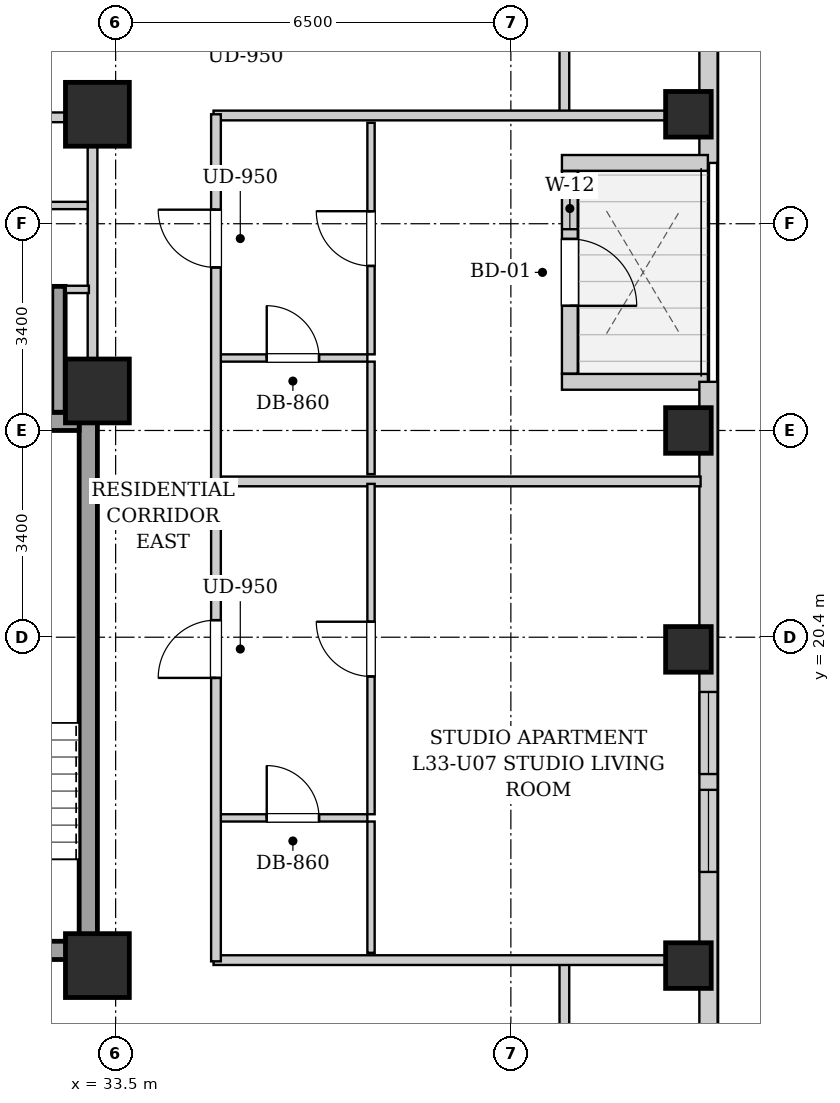
"""IFC4 building model, lengths in metres.
Left out: names, types, materials, properties, quantities, classifications, styles, units other than length and angle.
Written with IfcOpenShell. Run it as: python <this file> out.ifc"""

import sys

from ifc_helpers import new_model, si_unit, direction, frame, frame_2d, origin, origin_2d, place, context, subcontext, project, spatial, rectangle, extrude, element, fill, save


model = new_model("IFC4")
c1 = context("Model", 3, precision=1e-05, world=origin(), true_north=direction((0.0, 1.0)))
c2 = subcontext(c1, "Body", "Model", "MODEL_VIEW")
j1 = project(units=[si_unit("LENGTHUNIT", "METRE"), si_unit("PLANEANGLEUNIT", "RADIAN")], contexts=[c1])
p1 = place(None, origin())
s1 = spatial("IfcSite", under=j1, at=p1, CompositionType="ELEMENT")
p2 = place(p1, origin())
s2 = spatial("IfcBuilding", under=s1, at=p2, CompositionType="ELEMENT")
p3 = place(p2, frame((0.0, 0.0, 116.7)))
s3 = spatial("IfcBuildingStorey", under=s2, at=p3, CompositionType="ELEMENT", Elevation=116.7)
for number, where, z_axis, x_axis in (
    (1, (42.92, 15.0, 0.0), (0.0, 0.0, 1.0), (1.0, 0.0, 0.0)),
    (2, (42.92, 20.2, 0.0), (0.0, 0.0, 1.0), (1.0, 0.0, 0.0)),
    (3, (42.92, 23.8, 0.0), (0.0, 0.0, 1.0), (1.0, 0.0, 0.0)),
    (4, (42.92, 29.0, 0.0), (0.0, 0.0, 1.0), (1.0, 0.0, 0.0)),
):
    element("IfcColumn", number, at=place(p3, frame(where, z_axis=z_axis, x_axis=x_axis)), inside=s3, PredefinedType="COLUMN", context=c2, shape_type="SweptSolid", body=[
        extrude(rectangle(XDim=0.75, YDim=0.75, at=origin_2d()), origin(), (0.0, 0.0, 1.0), 3.2),
    ])
for number, where, z_axis, x_axis in (
    (5, (33.2, 15.0, 0.0), (0.0, 0.0, 1.0), (1.0, 0.0, 0.0)),
    (6, (33.2, 29.0, 0.0), (0.0, 0.0, 1.0), (1.0, 0.0, 0.0)),
    (7, (33.2, 24.45, 0.0), (0.0, 0.0, 1.0), (1.0, 0.0, 0.0)),
):
    element("IfcColumn", number, at=place(p3, frame(where, z_axis=z_axis, x_axis=x_axis)), inside=s3, PredefinedType="COLUMN", context=c2, shape_type="SweptSolid", body=[
        extrude(rectangle(XDim=1.05, YDim=1.05, at=origin_2d()), origin(), (0.0, 0.0, 1.0), 3.2),
    ])
p4 = place(p3, frame((43.25, 40.8, 0.0), z_axis=(0.0, 0.0, 1.0), x_axis=(0.0, -1.0, 0.0)))
e8 = element("IfcWall", 8, at=p4, inside=s3, PredefinedType="SOLIDWALL", context=c2, shape_type="SweptSolid", body=[
    extrude(rectangle(XDim=12.6, YDim=0.3, at=frame_2d((6.3, 0.0))), origin(), (0.0, 0.0, 1.0), 2.88),
])
p5 = place(p3, frame((43.24, 28.2, 0.0), z_axis=(0.0, 0.0, 1.0), x_axis=(-1.0, 0.0, 0.0)))
e9 = element("IfcWall", 9, at=p5, inside=s3, PredefinedType="SOLIDWALL", context=c2, shape_type="SweptSolid", body=[
    extrude(rectangle(XDim=2.4, YDim=0.26, at=frame_2d((1.2, 0.0))), origin(), (0.0, 0.0, 1.0), 2.88),
])
p6 = place(p3, frame((40.97, 28.066, 0.0), z_axis=(0.0, 0.0, 1.0), x_axis=(0.0, -1.0, 0.0)))
e10 = element("IfcWall", 10, at=p6, inside=s3, PredefinedType="SOLIDWALL", context=c2, shape_type="SweptSolid", body=[
    extrude(rectangle(XDim=3.332, YDim=0.26, at=frame_2d((1.666, 0.0))), origin(), (0.0, 0.0, 1.0), 2.88),
])
p7 = place(p6, frame((1.116, 0.0, 0.0)))
e11 = element("IfcOpeningElement", 11, at=p7, cuts=e10, PredefinedType="OPENING", context=c2, shape_type="SweptSolid", body=[
    extrude(rectangle(XDim=1.1, YDim=2.0, at=frame_2d((0.55, 1.0))), frame((0.0, 0.14, 0.0), z_axis=(0.0, -1.0, 0.0), x_axis=(1.0, 0.0, 0.0)), (0.0, 0.0, 1.0), 0.28),
])
p8 = place(p6, frame((0.276, 0.0, 0.55)))
e12 = element("IfcOpeningElement", 12, at=p8, cuts=e10, PredefinedType="OPENING", context=c2, shape_type="SweptSolid", body=[
    extrude(rectangle(XDim=0.68, YDim=1.2, at=frame_2d((0.34, 0.6))), frame((0.0, 0.14, 0.0), z_axis=(0.0, -1.0, 0.0), x_axis=(1.0, 0.0, 0.0)), (0.0, 0.0, 1.0), 0.28),
])
p9 = place(p3, frame((40.84, 24.6, 0.0), z_axis=(0.0, 0.0, 1.0), x_axis=(1.0, 0.0, 0.0)))
e13 = element("IfcWall", 13, at=p9, inside=s3, PredefinedType="SOLIDWALL", context=c2, shape_type="SweptSolid", body=[
    extrude(rectangle(XDim=2.4, YDim=0.26, at=frame_2d((1.2, 0.0))), origin(), (0.0, 0.0, 1.0), 2.88),
])
p10 = place(p3, frame((43.25, 24.6, 0.0), z_axis=(0.0, 0.0, 1.0), x_axis=(0.0, -1.0, 0.0)))
e14 = element("IfcWall", 14, at=p10, inside=s3, PredefinedType="SOLIDWALL", context=c2, shape_type="SweptSolid", body=[
    extrude(rectangle(XDim=22.1, YDim=0.3, at=frame_2d((11.05, 0.0))), origin(), (0.0, 0.0, 1.0), 2.88),
])
p11 = place(p10, frame((17.366, 0.0, 0.55)))
e15 = element("IfcOpeningElement", 15, at=p11, cuts=e14, PredefinedType="OPENING", context=c2, shape_type="SweptSolid", body=[
    extrude(rectangle(XDim=1.35, YDim=1.2, at=frame_2d((0.675, 0.6))), frame((0.0, 0.16, 0.0), z_axis=(0.0, -1.0, 0.0), x_axis=(1.0, 0.0, 0.0)), (0.0, 0.0, 1.0), 0.32),
])
p12 = place(p10, frame((15.535, 0.0, 0.55)))
e16 = element("IfcOpeningElement", 16, at=p12, cuts=e14, PredefinedType="OPENING", context=c2, shape_type="SweptSolid", body=[
    extrude(rectangle(XDim=1.35, YDim=1.2, at=frame_2d((0.675, 0.6))), frame((0.0, 0.16, 0.0), z_axis=(0.0, -1.0, 0.0), x_axis=(1.0, 0.0, 0.0)), (0.0, 0.0, 1.0), 0.32),
])
p13 = place(p10, frame((5.1, 0.0, 0.55)))
e17 = element("IfcOpeningElement", 17, at=p13, cuts=e14, PredefinedType="OPENING", context=c2, shape_type="SweptSolid", body=[
    extrude(rectangle(XDim=1.35, YDim=1.2, at=frame_2d((0.675, 0.6))), frame((0.0, 0.16, 0.0), z_axis=(0.0, -1.0, 0.0), x_axis=(1.0, 0.0, 0.0)), (0.0, 0.0, 1.0), 0.32),
])
p14 = place(p10, frame((6.71, 0.0, 0.55)))
e18 = element("IfcOpeningElement", 18, at=p14, cuts=e14, PredefinedType="OPENING", context=c2, shape_type="SweptSolid", body=[
    extrude(rectangle(XDim=1.35, YDim=1.2, at=frame_2d((0.675, 0.6))), frame((0.0, 0.16, 0.0), z_axis=(0.0, -1.0, 0.0), x_axis=(1.0, 0.0, 0.0)), (0.0, 0.0, 1.0), 0.32),
])
p15 = place(p3, frame((33.05, 15.1, 0.0), z_axis=(0.0, 0.0, 1.0), x_axis=(0.0, 1.0, 0.0)))
e19 = element("IfcWall", 19, at=p15, inside=s3, PredefinedType="SHEAR", context=c2, shape_type="SweptSolid", body=[
    extrude(rectangle(XDim=9.0, YDim=0.3, at=frame_2d((4.5, 0.0))), origin(), (0.0, 0.0, 1.0), 2.88),
])
p16 = place(p3, frame((30.05, 23.95, 0.0), z_axis=(0.0, 0.0, 1.0), x_axis=(1.0, 0.0, 0.0)))
e20 = element("IfcWall", 20, at=p16, inside=s3, PredefinedType="SHEAR", context=c2, shape_type="SweptSolid", body=[
    extrude(rectangle(XDim=2.85, YDim=0.3, at=frame_2d((1.425, 0.0))), origin(), (0.0, 0.0, 1.0), 2.88),
])
p17 = place(p3, frame((30.05, 15.25, 0.0), z_axis=(0.0, 0.0, 1.0), x_axis=(1.0, 0.0, 0.0)))
e21 = element("IfcWall", 21, at=p17, inside=s3, PredefinedType="SHEAR", context=c2, shape_type="SweptSolid", body=[
    extrude(rectangle(XDim=2.85, YDim=0.3, at=frame_2d((1.425, 0.0))), origin(), (0.0, 0.0, 1.0), 2.88),
])
p18 = place(p17, frame((0.86, 0.0, 0.0)))
e22 = element("IfcOpeningElement", 22, at=p18, cuts=e21, PredefinedType="OPENING", context=c2, shape_type="SweptSolid", body=[
    extrude(rectangle(XDim=1.1, YDim=2.05, at=frame_2d((0.55, 1.025))), frame((0.0, 0.16, 0.0), z_axis=(0.0, -1.0, 0.0), x_axis=(1.0, 0.0, 0.0)), (0.0, 0.0, 1.0), 0.32),
])
p19 = place(p3, frame((32.56, 24.1, 0.0), z_axis=(0.0, 0.0, 1.0), x_axis=(0.0, 1.0, 0.0)))
e23 = element("IfcWall", 23, at=p19, inside=s3, PredefinedType="SHEAR", context=c2, shape_type="SweptSolid", body=[
    extrude(rectangle(XDim=2.07, YDim=0.22, at=frame_2d((1.035, 0.0))), origin(), (0.0, 0.0, 1.0), 2.88),
])
p20 = place(p3, frame((33.12, 24.12, 0.0), z_axis=(0.0, 0.0, 1.0), x_axis=(0.0, 1.0, 0.0)))
e24 = element("IfcWall", 24, at=p20, inside=s3, PredefinedType="PARTITIONING", context=c2, shape_type="SweptSolid", body=[
    extrude(rectangle(XDim=4.76, YDim=0.16, at=frame_2d((2.38, 0.0))), origin(), (0.0, 0.0, 1.0), 2.215),
])
p21 = place(p3, frame((32.68, 26.12, 0.0), z_axis=(0.0, 0.0, 1.0), x_axis=(1.0, 0.0, 0.0)))
e25 = element("IfcWall", 25, at=p21, inside=s3, PredefinedType="PARTITIONING", context=c2, shape_type="SweptSolid", body=[
    extrude(rectangle(XDim=0.38, YDim=0.12, at=frame_2d((0.19, 0.0))), origin(), (0.0, 0.0, 1.0), 2.88),
])
p22 = place(p3, frame((30.16, 27.5, 0.0), z_axis=(0.0, 0.0, 1.0), x_axis=(1.0, 0.0, 0.0)))
e26 = element("IfcWall", 26, at=p22, inside=s3, PredefinedType="PARTITIONING", context=c2, shape_type="SweptSolid", body=[
    extrude(rectangle(XDim=2.88, YDim=0.12, at=frame_2d((1.44, 0.0))), origin(), (0.0, 0.0, 1.0), 2.88),
])
p23 = place(p22, frame((0.97, 0.0, 0.0)))
e27 = element("IfcOpeningElement", 27, at=p23, cuts=e26, PredefinedType="OPENING", context=c2, shape_type="SweptSolid", body=[
    extrude(rectangle(XDim=0.86, YDim=2.05, at=frame_2d((0.43, 1.025))), frame((0.0, 0.07, 0.0), z_axis=(0.0, -1.0, 0.0), x_axis=(1.0, 0.0, 0.0)), (0.0, 0.0, 1.0), 0.14),
])
p24 = place(p3, frame((30.08, 28.95, 0.0), z_axis=(0.0, 0.0, 1.0), x_axis=(1.0, 0.0, 0.0)))
e28 = element("IfcWall", 28, at=p24, inside=s3, PredefinedType="PARTITIONING", context=c2, shape_type="SweptSolid", body=[
    extrude(rectangle(XDim=2.96, YDim=0.16, at=frame_2d((1.48, 0.0))), origin(), (0.0, 0.0, 1.0), 2.88),
])
p25 = place(p24, frame((1.045, 0.0, 0.0)))
e29 = element("IfcOpeningElement", 29, at=p25, cuts=e28, PredefinedType="OPENING", context=c2, shape_type="SweptSolid", body=[
    extrude(rectangle(XDim=0.86, YDim=2.05, at=frame_2d((0.43, 1.025))), frame((0.0, 0.09, 0.0), z_axis=(0.0, -1.0, 0.0), x_axis=(1.0, 0.0, 0.0)), (0.0, 0.0, 1.0), 0.18),
])
for number, where, z_axis, x_axis in (
    (30, (40.88, 13.35, 0.0), (0.0, 0.0, 1.0), (0.0, 1.0, 0.0)),
    (31, (40.88, 28.98, 0.0), (0.0, 0.0, 1.0), (0.0, 1.0, 0.0)),
):
    element("IfcWall", number, at=place(p3, frame(where, z_axis=z_axis, x_axis=x_axis)), inside=s3, PredefinedType="PARTITIONING", context=c2, shape_type="SweptSolid", body=[
        extrude(rectangle(XDim=1.74, YDim=0.16, at=frame_2d((0.87, 0.0))), origin(), (0.0, 0.0, 1.0), 2.88),
    ])
for number, where, z_axis, x_axis in (
    (32, (35.11, 15.09, 0.0), (0.0, 0.0, 1.0), (1.0, 0.0, 0.0)),
    (33, (35.11, 28.98, 0.0), (0.0, 0.0, 1.0), (1.0, 0.0, 0.0)),
):
    element("IfcWall", number, at=place(p3, frame(where, z_axis=z_axis, x_axis=x_axis)), inside=s3, PredefinedType="PARTITIONING", context=c2, shape_type="SweptSolid", body=[
        extrude(rectangle(XDim=8.01, YDim=0.16, at=frame_2d((4.005, 0.0))), origin(), (0.0, 0.0, 1.0), 2.253),
    ])
p26 = place(p3, frame((35.19, 22.962, 0.0), z_axis=(0.0, 0.0, 1.0), x_axis=(1.0, 0.0, 0.0)))
e34 = element("IfcWall", 34, at=p26, inside=s3, PredefinedType="PARTITIONING", context=c2, shape_type="SweptSolid", body=[
    extrude(rectangle(XDim=7.93, YDim=0.16, at=frame_2d((3.965, 0.0))), origin(), (0.0, 0.0, 1.0), 2.88),
])
p27 = place(p3, frame((35.19, 17.429, 0.0), z_axis=(0.0, 0.0, 1.0), x_axis=(1.0, 0.0, 0.0)))
e35 = element("IfcWall", 35, at=p27, inside=s3, PredefinedType="PARTITIONING", context=c2, shape_type="SweptSolid", body=[
    extrude(rectangle(XDim=2.45, YDim=0.12, at=frame_2d((1.225, 0.0))), origin(), (0.0, 0.0, 1.0), 2.88),
])
p28 = place(p27, frame((0.795, 0.0, 0.0)))
e36 = element("IfcOpeningElement", 36, at=p28, cuts=e35, PredefinedType="OPENING", context=c2, shape_type="SweptSolid", body=[
    extrude(rectangle(XDim=0.86, YDim=2.05, at=frame_2d((0.43, 1.025))), frame((0.0, 0.07, 0.0), z_axis=(0.0, -1.0, 0.0), x_axis=(1.0, 0.0, 0.0)), (0.0, 0.0, 1.0), 0.14),
])
p29 = place(p3, frame((37.7, 15.21, 0.0), z_axis=(0.0, 0.0, 1.0), x_axis=(0.0, 1.0, 0.0)))
e37 = element("IfcWall", 37, at=p29, inside=s3, PredefinedType="PARTITIONING", context=c2, shape_type="SweptSolid", body=[
    extrude(rectangle(XDim=2.159, YDim=0.12, at=frame_2d((1.08, 0.0))), origin(), (0.0, 0.0, 1.0), 2.88),
])
p30 = place(p3, frame((37.7, 17.489, 0.0), z_axis=(0.0, 0.0, 1.0), x_axis=(0.0, 1.0, 0.0)))
e38 = element("IfcWall", 38, at=p30, inside=s3, PredefinedType="PARTITIONING", context=c2, shape_type="SweptSolid", body=[
    extrude(rectangle(XDim=5.433, YDim=0.12, at=frame_2d((2.717, 0.0))), origin(), (0.0, 0.0, 1.0), 2.88),
])
p31 = place(p30, frame((2.266, 0.0, 0.0)))
e39 = element("IfcOpeningElement", 39, at=p31, cuts=e38, PredefinedType="OPENING", context=c2, shape_type="SweptSolid", body=[
    extrude(rectangle(XDim=0.9, YDim=2.05, at=frame_2d((0.45, 1.025))), frame((0.0, 0.07, 0.0), z_axis=(0.0, -1.0, 0.0), x_axis=(1.0, 0.0, 0.0)), (0.0, 0.0, 1.0), 0.14),
])
p32 = place(p3, frame((35.19, 24.992, 0.0), z_axis=(0.0, 0.0, 1.0), x_axis=(1.0, 0.0, 0.0)))
e40 = element("IfcWall", 40, at=p32, inside=s3, PredefinedType="PARTITIONING", context=c2, shape_type="SweptSolid", body=[
    extrude(rectangle(XDim=2.45, YDim=0.12, at=frame_2d((1.225, 0.0))), origin(), (0.0, 0.0, 1.0), 2.88),
])
p33 = place(p32, frame((0.795, 0.0, 0.0)))
e41 = element("IfcOpeningElement", 41, at=p33, cuts=e40, PredefinedType="OPENING", context=c2, shape_type="SweptSolid", body=[
    extrude(rectangle(XDim=0.86, YDim=2.05, at=frame_2d((0.43, 1.025))), frame((0.0, 0.07, 0.0), z_axis=(0.0, -1.0, 0.0), x_axis=(1.0, 0.0, 0.0)), (0.0, 0.0, 1.0), 0.14),
])
p34 = place(p3, frame((37.7, 23.082, 0.0), z_axis=(0.0, 0.0, 1.0), x_axis=(0.0, 1.0, 0.0)))
e42 = element("IfcWall", 42, at=p34, inside=s3, PredefinedType="PARTITIONING", context=c2, shape_type="SweptSolid", body=[
    extrude(rectangle(XDim=1.85, YDim=0.12, at=frame_2d((0.925, 0.0))), origin(), (0.0, 0.0, 1.0), 2.88),
])
p35 = place(p3, frame((37.7, 25.052, 0.0), z_axis=(0.0, 0.0, 1.0), x_axis=(0.0, 1.0, 0.0)))
e43 = element("IfcWall", 43, at=p35, inside=s3, PredefinedType="PARTITIONING", context=c2, shape_type="SweptSolid", body=[
    extrude(rectangle(XDim=3.808, YDim=0.12, at=frame_2d((1.904, 0.0))), origin(), (0.0, 0.0, 1.0), 2.88),
])
p36 = place(p35, frame((1.454, 0.0, 0.0)))
e44 = element("IfcOpeningElement", 44, at=p36, cuts=e43, PredefinedType="OPENING", context=c2, shape_type="SweptSolid", body=[
    extrude(rectangle(XDim=0.9, YDim=2.05, at=frame_2d((0.45, 1.025))), frame((0.0, 0.07, 0.0), z_axis=(0.0, -1.0, 0.0), x_axis=(1.0, 0.0, 0.0)), (0.0, 0.0, 1.0), 0.14),
])
p37 = place(p3, frame((35.15, 15.07, 0.0), z_axis=(0.0, 0.0, 1.0), x_axis=(0.0, 1.0, 0.0)))
e45 = element("IfcWall", 45, at=p37, inside=s3, PredefinedType="PARTITIONING", context=c2, shape_type="SweptSolid", body=[
    extrude(rectangle(XDim=13.93, YDim=0.16, at=frame_2d((6.965, 0.0))), origin(), (0.0, 0.0, 1.0), 2.88),
])
p38 = place(p37, frame((4.661, 0.0, 0.0)))
e46 = element("IfcOpeningElement", 46, at=p38, cuts=e45, PredefinedType="OPENING", context=c2, shape_type="SweptSolid", body=[
    extrude(rectangle(XDim=0.95, YDim=2.1, at=frame_2d((0.475, 1.05))), frame((0.0, 0.09, 0.0), z_axis=(0.0, -1.0, 0.0), x_axis=(1.0, 0.0, 0.0)), (0.0, 0.0, 1.0), 0.18),
])
p39 = place(p37, frame((11.411, 0.0, 0.0)))
e47 = element("IfcOpeningElement", 47, at=p39, cuts=e45, PredefinedType="OPENING", context=c2, shape_type="SweptSolid", body=[
    extrude(rectangle(XDim=0.95, YDim=2.1, at=frame_2d((0.475, 1.05))), frame((0.0, 0.09, 0.0), z_axis=(0.0, -1.0, 0.0), x_axis=(1.0, 0.0, 0.0)), (0.0, 0.0, 1.0), 0.18),
])
p40 = place(p28, origin())
e48 = element("IfcDoor", 48, at=p40, inside=s3, OperationType="SINGLE_SWING_LEFT", PredefinedType="DOOR", context=c2, shape_type="SweptSolid", body=[
    extrude(rectangle(XDim=0.86, YDim=2.05, at=frame_2d((0.43, 1.025))), frame((0.0, 0.025, 0.0), z_axis=(0.0, -1.0, 0.0), x_axis=(1.0, 0.0, 0.0)), (0.0, 0.0, 1.0), 0.05),
])
fill(e36, e48)
p41 = place(p31, origin())
e49 = element("IfcDoor", 49, at=p41, inside=s3, OperationType="SINGLE_SWING_RIGHT", PredefinedType="DOOR", context=c2, shape_type="SweptSolid", body=[
    extrude(rectangle(XDim=0.9, YDim=2.05, at=frame_2d((0.45, 1.025))), frame((0.0, 0.025, 0.0), z_axis=(0.0, -1.0, 0.0), x_axis=(1.0, 0.0, 0.0)), (0.0, 0.0, 1.0), 0.05),
])
fill(e39, e49)
p42 = place(p33, origin())
e50 = element("IfcDoor", 50, at=p42, inside=s3, OperationType="SINGLE_SWING_LEFT", PredefinedType="DOOR", context=c2, shape_type="SweptSolid", body=[
    extrude(rectangle(XDim=0.86, YDim=2.05, at=frame_2d((0.43, 1.025))), frame((0.0, 0.025, 0.0), z_axis=(0.0, -1.0, 0.0), x_axis=(1.0, 0.0, 0.0)), (0.0, 0.0, 1.0), 0.05),
])
fill(e41, e50)
p43 = place(p36, origin())
e51 = element("IfcDoor", 51, at=p43, inside=s3, OperationType="SINGLE_SWING_RIGHT", PredefinedType="DOOR", context=c2, shape_type="SweptSolid", body=[
    extrude(rectangle(XDim=0.9, YDim=2.05, at=frame_2d((0.45, 1.025))), frame((0.0, 0.025, 0.0), z_axis=(0.0, -1.0, 0.0), x_axis=(1.0, 0.0, 0.0)), (0.0, 0.0, 1.0), 0.05),
])
fill(e44, e51)
p44 = place(p38, origin())
e52 = element("IfcDoor", 52, at=p44, inside=s3, OperationType="SINGLE_SWING_LEFT", PredefinedType="DOOR", context=c2, shape_type="SweptSolid", body=[
    extrude(rectangle(XDim=0.95, YDim=2.1, at=frame_2d((0.475, 1.05))), frame((0.0, 0.025, 0.0), z_axis=(0.0, -1.0, 0.0), x_axis=(1.0, 0.0, 0.0)), (0.0, 0.0, 1.0), 0.05),
])
fill(e46, e52)
p45 = place(p39, origin())
e53 = element("IfcDoor", 53, at=p45, inside=s3, OperationType="SINGLE_SWING_RIGHT", PredefinedType="DOOR", context=c2, shape_type="SweptSolid", body=[
    extrude(rectangle(XDim=0.95, YDim=2.1, at=frame_2d((0.475, 1.05))), frame((0.0, 0.025, 0.0), z_axis=(0.0, -1.0, 0.0), x_axis=(1.0, 0.0, 0.0)), (0.0, 0.0, 1.0), 0.05),
])
fill(e47, e53)
p46 = place(p7, origin())
e54 = element("IfcDoor", 54, at=p46, inside=s3, OperationType="SINGLE_SWING_RIGHT", PredefinedType="DOOR", context=c2, shape_type="SweptSolid", body=[
    extrude(rectangle(XDim=1.1, YDim=2.0, at=frame_2d((0.55, 1.0))), frame((0.0, 0.025, 0.0), z_axis=(0.0, -1.0, 0.0), x_axis=(1.0, 0.0, 0.0)), (0.0, 0.0, 1.0), 0.05),
])
fill(e11, e54)
p47 = place(p13, origin())
e55 = element("IfcWindow", 55, at=p47, inside=s3, PartitioningType="SINGLE_PANEL", PredefinedType="WINDOW", context=c2, shape_type="SweptSolid", body=[
    extrude(rectangle(XDim=1.35, YDim=1.2, at=frame_2d((0.675, 0.6))), frame((0.0, 0.03, 0.0), z_axis=(0.0, -1.0, 0.0), x_axis=(1.0, 0.0, 0.0)), (0.0, 0.0, 1.0), 0.06),
])
fill(e17, e55)
p48 = place(p14, origin())
e56 = element("IfcWindow", 56, at=p48, inside=s3, PartitioningType="SINGLE_PANEL", PredefinedType="WINDOW", context=c2, shape_type="SweptSolid", body=[
    extrude(rectangle(XDim=1.35, YDim=1.2, at=frame_2d((0.675, 0.6))), frame((0.0, 0.03, 0.0), z_axis=(0.0, -1.0, 0.0), x_axis=(1.0, 0.0, 0.0)), (0.0, 0.0, 1.0), 0.06),
])
fill(e18, e56)
p49 = place(p8, origin())
e57 = element("IfcWindow", 57, at=p49, inside=s3, PartitioningType="SINGLE_PANEL", PredefinedType="WINDOW", context=c2, shape_type="SweptSolid", body=[
    extrude(rectangle(XDim=0.68, YDim=1.2, at=frame_2d((0.34, 0.6))), frame((0.0, 0.03, 0.0), z_axis=(0.0, -1.0, 0.0), x_axis=(1.0, 0.0, 0.0)), (0.0, 0.0, 1.0), 0.06),
])
fill(e12, e57)
save(model, sys.argv[1])
